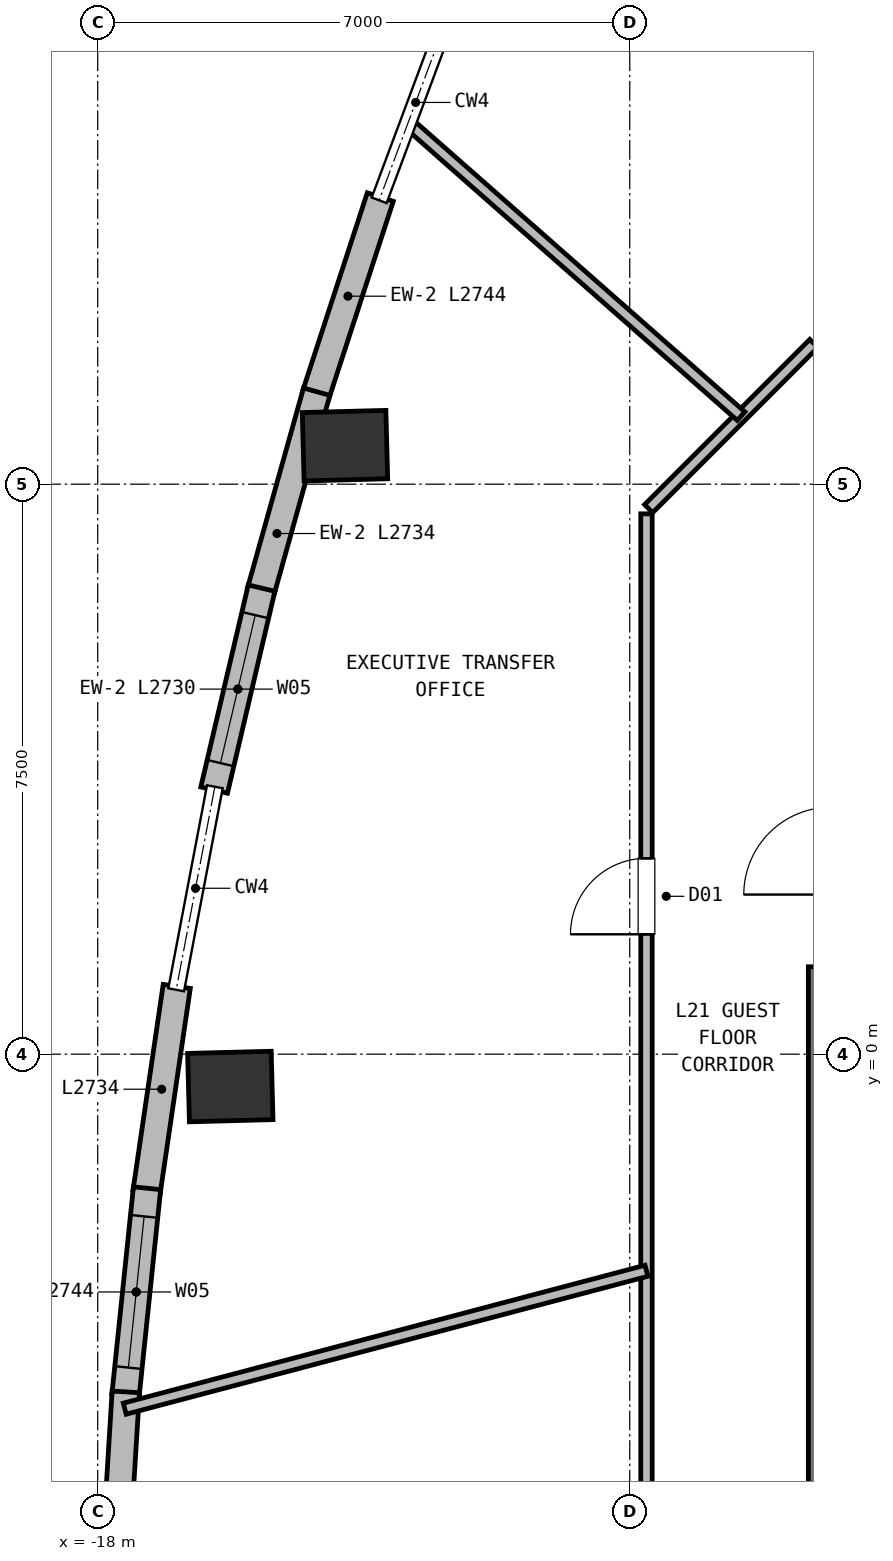
"""IFC4 building model, lengths in metres.
Left out: names, types, materials, properties, quantities, classifications, styles, units other than length and angle.
Written with IfcOpenShell. Run it as: python <this file> out.ifc"""

import sys

from ifc_helpers import new_model, si_unit, direction, frame, frame_2d, origin, origin_2d, place, context, subcontext, project, spatial, rectangle, extrude, element, fill, save


model = new_model("IFC4")
c1 = context("Model", 3, precision=1e-05, world=origin(), true_north=direction((0.0, 1.0)))
c2 = subcontext(c1, "Body", "Model", "MODEL_VIEW")
j1 = project(units=[si_unit("LENGTHUNIT", "METRE"), si_unit("PLANEANGLEUNIT", "RADIAN")], contexts=[c1])
p1 = place(None, origin())
s1 = spatial("IfcSite", under=j1, at=p1, CompositionType="ELEMENT")
p2 = place(p1, origin())
s2 = spatial("IfcBuilding", under=s1, at=p2, CompositionType="ELEMENT")
p3 = place(p2, frame((0.0, 0.0, 88.25)))
s3 = spatial("IfcBuildingStorey", under=s2, at=p3, CompositionType="ELEMENT", Elevation=88.25)
p4 = place(p3, frame((-8.35, -6.95, 0.0), z_axis=(0.0, 0.0, 1.0), x_axis=(0.0, 1.0, 0.0)))
e1 = element("IfcWall", 1, at=p4, inside=s3, PredefinedType="SHEAR", context=c2, shape_type="SweptSolid", body=[
    extrude(rectangle(XDim=8.1, YDim=0.6, at=frame_2d((4.05, 0.0))), origin(), (0.0, 0.0, 1.0), 4.21),
])
for number, where, z_axis, x_axis in (
    (2, (-14.747, 8.007, 0.0), (0.0, 0.0, 1.0), (-0.026, 1.0, 0.0)),
    (3, (-16.255, -0.426, 0.0), (0.0, 0.0, 1.0), (-0.026, 1.0, 0.0)),
):
    element("IfcColumn", number, at=place(p3, frame(where, z_axis=z_axis, x_axis=x_axis)), inside=s3, PredefinedType="COLUMN", context=c2, shape_type="SweptSolid", body=[
        extrude(rectangle(XDim=0.9, YDim=1.1, at=origin_2d()), origin(), (0.0, 0.0, 1.0), 4.5),
    ])
p5 = place(p3, frame((-15.133, 8.669, 0.0), z_axis=(0.0, 0.0, 1.0), x_axis=(0.310162209331, 0.950683650802, 0.0)))
e4 = element("IfcWall", 4, at=p5, inside=s3, PredefinedType="SOLIDWALL", context=c2, shape_type="SweptSolid", body=[
    extrude(rectangle(XDim=2.744, YDim=0.36, at=frame_2d((1.372, 0.0))), origin(), (0.0, 0.0, 1.0), 4.21),
])
p6 = place(p3, frame((-15.856, 6.084, 0.0), z_axis=(0.0, 0.0, 1.0), x_axis=(0.269729276569, 0.962936195893, 0.0)))
e5 = element("IfcWall", 5, at=p6, inside=s3, PredefinedType="SOLIDWALL", context=c2, shape_type="SweptSolid", body=[
    extrude(rectangle(XDim=2.734, YDim=0.36, at=frame_2d((1.367, 0.0))), origin(), (0.0, 0.0, 1.0), 4.21),
])
p7 = place(p3, frame((-16.468, 3.475, 0.0), z_axis=(0.0, 0.0, 1.0), x_axis=(0.228620535592, 0.973515614002, 0.0)))
e6 = element("IfcWall", 6, at=p7, inside=s3, PredefinedType="SOLIDWALL", context=c2, shape_type="SweptSolid", body=[
    extrude(rectangle(XDim=2.729, YDim=0.36, at=frame_2d((1.365, 0.0))), origin(), (0.0, 0.0, 1.0), 4.21),
])
p8 = place(p7, frame((0.365, 0.0, 0.72)))
e7 = element("IfcOpeningElement", 7, at=p8, cuts=e6, PredefinedType="OPENING", context=c2, shape_type="SweptSolid", body=[
    extrude(rectangle(XDim=2.0, YDim=2.15, at=frame_2d((1.0, 1.075))), frame((0.0, 0.19, 0.0), z_axis=(0.0, -1.0, 0.0), x_axis=(1.0, 0.0, 0.0)), (0.0, 0.0, 1.0), 0.38),
])
p9 = place(p3, frame((-17.357, -1.814, 0.0), z_axis=(0.0, 0.0, 1.0), x_axis=(0.145182948163, 0.989404826935, 0.0)))
e8 = element("IfcWall", 8, at=p9, inside=s3, PredefinedType="SOLIDWALL", context=c2, shape_type="SweptSolid", body=[
    extrude(rectangle(XDim=2.734, YDim=0.36, at=frame_2d((1.367, 0.0))), origin(), (0.0, 0.0, 1.0), 4.21),
])
p10 = place(p3, frame((-17.635, -4.493, 0.0), z_axis=(0.0, 0.0, 1.0), x_axis=(0.103299843757, 0.994650261288, 0.0)))
e9 = element("IfcWall", 9, at=p10, inside=s3, PredefinedType="SOLIDWALL", context=c2, shape_type="SweptSolid", body=[
    extrude(rectangle(XDim=2.744, YDim=0.36, at=frame_2d((1.372, 0.0))), origin(), (0.0, 0.0, 1.0), 4.21),
])
p11 = place(p10, frame((0.372, 0.0, 0.72)))
e10 = element("IfcOpeningElement", 10, at=p11, cuts=e9, PredefinedType="OPENING", context=c2, shape_type="SweptSolid", body=[
    extrude(rectangle(XDim=2.0, YDim=2.15, at=frame_2d((1.0, 1.075))), frame((0.0, 0.19, 0.0), z_axis=(0.0, -1.0, 0.0), x_axis=(1.0, 0.0, 0.0)), (0.0, 0.0, 1.0), 0.38),
])
p12 = place(p3, frame((-17.801, -7.197, 0.0), z_axis=(0.0, 0.0, 1.0), x_axis=(0.0615958871, 0.99810117057, 0.0)))
e11 = element("IfcWall", 11, at=p12, inside=s3, PredefinedType="SOLIDWALL", context=c2, shape_type="SweptSolid", body=[
    extrude(rectangle(XDim=2.759, YDim=0.36, at=frame_2d((1.379, 0.0))), origin(), (0.0, 0.0, 1.0), 4.21),
])
p13 = place(p3, frame((-10.752, 7.178, 0.0), z_axis=(0.0, 0.0, 1.0), x_axis=(0.707067066127, 0.707146494016, 0.0)))
e12 = element("IfcWall", 12, at=p13, inside=s3, PredefinedType="PARTITIONING", context=c2, shape_type="SweptSolid", body=[
    extrude(rectangle(XDim=3.074, YDim=0.15, at=frame_2d((1.537, 0.0))), origin(), (0.0, 0.0, 1.0), 4.21),
])
p14 = place(p3, frame((-10.78, -7.11, 0.0), z_axis=(0.0, 0.0, 1.0), x_axis=(0.0, 1.0, 0.0)))
e13 = element("IfcWall", 13, at=p14, inside=s3, PredefinedType="PARTITIONING", context=c2, shape_type="SweptSolid", body=[
    extrude(rectangle(XDim=14.22, YDim=0.15, at=frame_2d((7.11, 0.0))), origin(), (0.0, 0.0, 1.0), 4.21),
])
p15 = place(p14, frame((8.687, 0.0, 0.0)))
e14 = element("IfcOpeningElement", 14, at=p15, cuts=e13, PredefinedType="OPENING", context=c2, shape_type="SweptSolid", body=[
    extrude(rectangle(XDim=1.0, YDim=2.15, at=frame_2d((0.5, 1.075))), frame((0.0, 0.085, 0.0), z_axis=(0.0, -1.0, 0.0), x_axis=(1.0, 0.0, 0.0)), (0.0, 0.0, 1.0), 0.17),
])
p16 = place(p3, frame((-9.535, 8.395, 0.0), z_axis=(0.0, 0.0, 1.0), x_axis=(-0.750568336122, 0.660792836531, 0.0)))
e15 = element("IfcWall", 15, at=p16, inside=s3, PredefinedType="PARTITIONING", context=c2, shape_type="SweptSolid", body=[
    extrude(rectangle(XDim=5.839, YDim=0.15, at=frame_2d((2.919, 0.0))), origin(), (0.0, 0.0, 1.0), 4.21),
])
p17 = place(p3, frame((-10.78, -2.85, 0.0), z_axis=(0.0, 0.0, 1.0), x_axis=(-0.966783490984, -0.255596716645, 0.0)))
e16 = element("IfcWall", 16, at=p17, inside=s3, PredefinedType="PARTITIONING", context=c2, shape_type="SweptSolid", body=[
    extrude(rectangle(XDim=7.1, YDim=0.15, at=frame_2d((3.55, 0.0))), origin(), (0.0, 0.0, 1.0), 4.21),
])
p18 = place(p8, origin())
e17 = element("IfcWindow", 17, at=p18, inside=s3, PartitioningType="SINGLE_PANEL", PredefinedType="WINDOW", context=c2, shape_type="SweptSolid", body=[
    extrude(rectangle(XDim=2.0, YDim=2.15, at=frame_2d((1.0, 1.075))), frame((0.0, 0.03, 0.0), z_axis=(0.0, -1.0, 0.0), x_axis=(1.0, 0.0, 0.0)), (0.0, 0.0, 1.0), 0.06),
])
fill(e7, e17)
p19 = place(p11, origin())
e18 = element("IfcWindow", 18, at=p19, inside=s3, PartitioningType="SINGLE_PANEL", PredefinedType="WINDOW", context=c2, shape_type="SweptSolid", body=[
    extrude(rectangle(XDim=2.0, YDim=2.15, at=frame_2d((1.0, 1.075))), frame((0.0, 0.03, 0.0), z_axis=(0.0, -1.0, 0.0), x_axis=(1.0, 0.0, 0.0)), (0.0, 0.0, 1.0), 0.06),
])
fill(e10, e18)
p20 = place(p15, origin())
e19 = element("IfcDoor", 19, at=p20, inside=s3, OperationType="SINGLE_SWING_LEFT", PredefinedType="DOOR", context=c2, shape_type="SweptSolid", body=[
    extrude(rectangle(XDim=1.0, YDim=2.15, at=frame_2d((0.5, 1.075))), frame((0.0, 0.025, 0.0), z_axis=(0.0, -1.0, 0.0), x_axis=(1.0, 0.0, 0.0)), (0.0, 0.0, 1.0), 0.05),
])
fill(e14, e19)
save(model, sys.argv[1])
